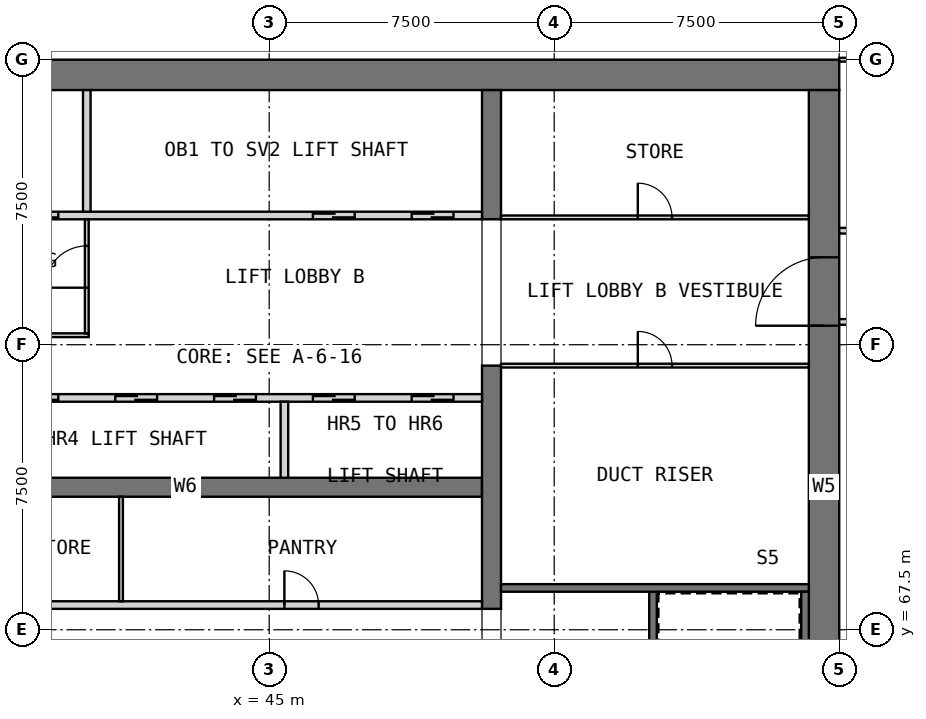
"""IFC4 building model, lengths in metres.
Left out: names, types, materials, properties, quantities, classifications, styles, units other than length and angle.
Written with IfcOpenShell. Run it as: python <this file> out.ifc"""

import sys

from ifc_helpers import new_model, si_unit, direction, frame, frame_2d, origin, place, context, subcontext, project, spatial, rectangle, extrude, element, fill, save


model = new_model("IFC4")
c1 = context("Model", 3, precision=1e-05, world=origin(), true_north=direction((0.0, 1.0)))
c2 = subcontext(c1, "Body", "Model", "MODEL_VIEW")
j1 = project(units=[si_unit("LENGTHUNIT", "METRE"), si_unit("PLANEANGLEUNIT", "RADIAN")], contexts=[c1])
p1 = place(None, origin())
s1 = spatial("IfcSite", under=j1, at=p1, CompositionType="ELEMENT")
p2 = place(p1, origin())
s2 = spatial("IfcBuilding", under=s1, at=p2, CompositionType="ELEMENT")
p3 = place(p2, frame((0.0, 0.0, 133.8)))
s3 = spatial("IfcBuildingStorey", under=s2, at=p3, CompositionType="ELEMENT", Elevation=133.8)
p4 = place(p3, frame((30.0, 82.1, 0.0), z_axis=(0.0, 0.0, 1.0), x_axis=(1.0, 0.0, 0.0)))
e1 = element("IfcWall", 1, at=p4, inside=s3, PredefinedType="SHEAR", context=c2, shape_type="SweptSolid", body=[
    extrude(rectangle(XDim=30.0, YDim=0.8, at=frame_2d((15.0, 0.0))), origin(), (0.0, 0.0, 1.0), 3.6),
])
p5 = place(p3, frame((59.6, 60.8, 0.0), z_axis=(0.0, 0.0, 1.0), x_axis=(0.0, 1.0, 0.0)))
e2 = element("IfcWall", 2, at=p5, inside=s3, PredefinedType="SHEAR", context=c2, shape_type="SweptSolid", body=[
    extrude(rectangle(XDim=20.9, YDim=0.8, at=frame_2d((10.45, 0.0))), origin(), (0.0, 0.0, 1.0), 3.6),
])
p6 = place(p5, frame((14.7, 0.0, 0.0)))
e3 = element("IfcOpeningElement", 3, at=p6, cuts=e2, PredefinedType="OPENING", context=c2, shape_type="SweptSolid", body=[
    extrude(rectangle(XDim=1.8, YDim=2.1, at=frame_2d((0.9, 1.05))), frame((0.0, 0.41, 0.0), z_axis=(0.0, -1.0, 0.0), x_axis=(1.0, 0.0, 0.0)), (0.0, 0.0, 1.0), 0.82),
])
p7 = place(p3, frame((35.0, 71.25, 0.0), z_axis=(0.0, 0.0, 1.0), x_axis=(1.0, 0.0, 0.0)))
e4 = element("IfcWall", 4, at=p7, inside=s3, PredefinedType="SHEAR", context=c2, shape_type="SweptSolid", body=[
    extrude(rectangle(XDim=15.6, YDim=0.5, at=frame_2d((7.8, 0.0))), origin(), (0.0, 0.0, 1.0), 3.6),
])
p8 = place(p3, frame((50.85, 68.05, 0.0), z_axis=(0.0, 0.0, 1.0), x_axis=(0.0, 1.0, 0.0)))
e5 = element("IfcWall", 5, at=p8, inside=s3, PredefinedType="SHEAR", context=c2, shape_type="SweptSolid", body=[
    extrude(rectangle(XDim=6.4, YDim=0.5, at=frame_2d((3.2, 0.0))), origin(), (0.0, 0.0, 1.0), 3.6),
])
p9 = place(p3, frame((50.85, 78.3, 0.0), z_axis=(0.0, 0.0, 1.0), x_axis=(0.0, 1.0, 0.0)))
e6 = element("IfcWall", 6, at=p9, inside=s3, PredefinedType="SHEAR", context=c2, shape_type="SweptSolid", body=[
    extrude(rectangle(XDim=3.4, YDim=0.5, at=frame_2d((1.7, 0.0))), origin(), (0.0, 0.0, 1.0), 3.6),
])
p10 = place(p3, frame((35.0, 68.15, 0.0), z_axis=(0.0, 0.0, 1.0), x_axis=(1.0, 0.0, 0.0)))
e7 = element("IfcWall", 7, at=p10, inside=s3, PredefinedType="PARTITIONING", context=c2, shape_type="SweptSolid", body=[
    extrude(rectangle(XDim=15.6, YDim=0.2, at=frame_2d((7.8, 0.0))), origin(), (0.0, 0.0, 1.0), 3.35),
])
p11 = place(p10, frame((2.6, 0.0, 0.0)))
e8 = element("IfcOpeningElement", 8, at=p11, cuts=e7, PredefinedType="OPENING", context=c2, shape_type="SweptSolid", body=[
    extrude(rectangle(XDim=0.9, YDim=2.1, at=frame_2d((0.45, 1.05))), frame((0.0, 0.11, 0.0), z_axis=(0.0, -1.0, 0.0), x_axis=(1.0, 0.0, 0.0)), (0.0, 0.0, 1.0), 0.22),
])
p12 = place(p10, frame((10.4, 0.0, 0.0)))
e9 = element("IfcOpeningElement", 9, at=p12, cuts=e7, PredefinedType="OPENING", context=c2, shape_type="SweptSolid", body=[
    extrude(rectangle(XDim=0.9, YDim=2.1, at=frame_2d((0.45, 1.05))), frame((0.0, 0.11, 0.0), z_axis=(0.0, -1.0, 0.0), x_axis=(1.0, 0.0, 0.0)), (0.0, 0.0, 1.0), 0.22),
])
p13 = place(p3, frame((41.1, 68.25, 0.0), z_axis=(0.0, 0.0, 1.0), x_axis=(0.0, 1.0, 0.0)))
e10 = element("IfcWall", 10, at=p13, inside=s3, PredefinedType="PARTITIONING", context=c2, shape_type="SweptSolid", body=[
    extrude(rectangle(XDim=2.75, YDim=0.1, at=frame_2d((1.375, 0.0))), origin(), (0.0, 0.0, 1.0), 3.35),
])
p14 = place(p3, frame((35.0, 73.6, 0.0), z_axis=(0.0, 0.0, 1.0), x_axis=(1.0, 0.0, 0.0)))
e11 = element("IfcWall", 11, at=p14, inside=s3, PredefinedType="SOLIDWALL", context=c2, shape_type="SweptSolid", body=[
    extrude(rectangle(XDim=15.6, YDim=0.2, at=frame_2d((7.8, 0.0))), origin(), (0.0, 0.0, 1.0), 3.6),
])
p15 = place(p14, frame((0.75, 0.0, 0.0)))
e12 = element("IfcOpeningElement", 12, at=p15, cuts=e11, PredefinedType="OPENING", context=c2, shape_type="SweptSolid", body=[
    extrude(rectangle(XDim=1.1, YDim=2.1, at=frame_2d((0.55, 1.05))), frame((0.0, 0.11, 0.0), z_axis=(0.0, -1.0, 0.0), x_axis=(1.0, 0.0, 0.0)), (0.0, 0.0, 1.0), 0.22),
])
p16 = place(p14, frame((3.35, 0.0, 0.0)))
e13 = element("IfcOpeningElement", 13, at=p16, cuts=e11, PredefinedType="OPENING", context=c2, shape_type="SweptSolid", body=[
    extrude(rectangle(XDim=1.1, YDim=2.1, at=frame_2d((0.55, 1.05))), frame((0.0, 0.11, 0.0), z_axis=(0.0, -1.0, 0.0), x_axis=(1.0, 0.0, 0.0)), (0.0, 0.0, 1.0), 0.22),
])
p17 = place(p14, frame((5.95, 0.0, 0.0)))
e14 = element("IfcOpeningElement", 14, at=p17, cuts=e11, PredefinedType="OPENING", context=c2, shape_type="SweptSolid", body=[
    extrude(rectangle(XDim=1.1, YDim=2.1, at=frame_2d((0.55, 1.05))), frame((0.0, 0.11, 0.0), z_axis=(0.0, -1.0, 0.0), x_axis=(1.0, 0.0, 0.0)), (0.0, 0.0, 1.0), 0.22),
])
p18 = place(p14, frame((8.55, 0.0, 0.0)))
e15 = element("IfcOpeningElement", 15, at=p18, cuts=e11, PredefinedType="OPENING", context=c2, shape_type="SweptSolid", body=[
    extrude(rectangle(XDim=1.1, YDim=2.1, at=frame_2d((0.55, 1.05))), frame((0.0, 0.11, 0.0), z_axis=(0.0, -1.0, 0.0), x_axis=(1.0, 0.0, 0.0)), (0.0, 0.0, 1.0), 0.22),
])
p19 = place(p14, frame((11.15, 0.0, 0.0)))
e16 = element("IfcOpeningElement", 16, at=p19, cuts=e11, PredefinedType="OPENING", context=c2, shape_type="SweptSolid", body=[
    extrude(rectangle(XDim=1.1, YDim=2.1, at=frame_2d((0.55, 1.05))), frame((0.0, 0.11, 0.0), z_axis=(0.0, -1.0, 0.0), x_axis=(1.0, 0.0, 0.0)), (0.0, 0.0, 1.0), 0.22),
])
p20 = place(p14, frame((13.75, 0.0, 0.0)))
e17 = element("IfcOpeningElement", 17, at=p20, cuts=e11, PredefinedType="OPENING", context=c2, shape_type="SweptSolid", body=[
    extrude(rectangle(XDim=1.1, YDim=2.1, at=frame_2d((0.55, 1.05))), frame((0.0, 0.11, 0.0), z_axis=(0.0, -1.0, 0.0), x_axis=(1.0, 0.0, 0.0)), (0.0, 0.0, 1.0), 0.22),
])
p21 = place(p3, frame((45.4, 71.5, 0.0), z_axis=(0.0, 0.0, 1.0), x_axis=(0.0, 1.0, 0.0)))
e18 = element("IfcWall", 18, at=p21, inside=s3, PredefinedType="SOLIDWALL", context=c2, shape_type="SweptSolid", body=[
    extrude(rectangle(XDim=2.0, YDim=0.2, at=frame_2d((1.0, 0.0))), origin(), (0.0, 0.0, 1.0), 3.6),
])
p22 = place(p3, frame((35.0, 78.4, 0.0), z_axis=(0.0, 0.0, 1.0), x_axis=(1.0, 0.0, 0.0)))
e19 = element("IfcWall", 19, at=p22, inside=s3, PredefinedType="SOLIDWALL", context=c2, shape_type="SweptSolid", body=[
    extrude(rectangle(XDim=15.6, YDim=0.2, at=frame_2d((7.8, 0.0))), origin(), (0.0, 0.0, 1.0), 3.6),
])
p23 = place(p22, frame((0.75, 0.0, 0.0)))
e20 = element("IfcOpeningElement", 20, at=p23, cuts=e19, PredefinedType="OPENING", context=c2, shape_type="SweptSolid", body=[
    extrude(rectangle(XDim=1.1, YDim=2.1, at=frame_2d((0.55, 1.05))), frame((0.0, 0.11, 0.0), z_axis=(0.0, -1.0, 0.0), x_axis=(1.0, 0.0, 0.0)), (0.0, 0.0, 1.0), 0.22),
])
p24 = place(p22, frame((3.35, 0.0, 0.0)))
e21 = element("IfcOpeningElement", 21, at=p24, cuts=e19, PredefinedType="OPENING", context=c2, shape_type="SweptSolid", body=[
    extrude(rectangle(XDim=1.1, YDim=2.1, at=frame_2d((0.55, 1.05))), frame((0.0, 0.11, 0.0), z_axis=(0.0, -1.0, 0.0), x_axis=(1.0, 0.0, 0.0)), (0.0, 0.0, 1.0), 0.22),
])
p25 = place(p22, frame((11.15, 0.0, 0.0)))
e22 = element("IfcOpeningElement", 22, at=p25, cuts=e19, PredefinedType="OPENING", context=c2, shape_type="SweptSolid", body=[
    extrude(rectangle(XDim=1.1, YDim=2.1, at=frame_2d((0.55, 1.05))), frame((0.0, 0.11, 0.0), z_axis=(0.0, -1.0, 0.0), x_axis=(1.0, 0.0, 0.0)), (0.0, 0.0, 1.0), 0.22),
])
p26 = place(p22, frame((13.75, 0.0, 0.0)))
e23 = element("IfcOpeningElement", 23, at=p26, cuts=e19, PredefinedType="OPENING", context=c2, shape_type="SweptSolid", body=[
    extrude(rectangle(XDim=1.1, YDim=2.1, at=frame_2d((0.55, 1.05))), frame((0.0, 0.11, 0.0), z_axis=(0.0, -1.0, 0.0), x_axis=(1.0, 0.0, 0.0)), (0.0, 0.0, 1.0), 0.22),
])
p27 = place(p3, frame((40.2, 78.5, 0.0), z_axis=(0.0, 0.0, 1.0), x_axis=(0.0, 1.0, 0.0)))
e24 = element("IfcWall", 24, at=p27, inside=s3, PredefinedType="SOLIDWALL", context=c2, shape_type="SweptSolid", body=[
    extrude(rectangle(XDim=3.2, YDim=0.2, at=frame_2d((1.6, 0.0))), origin(), (0.0, 0.0, 1.0), 3.6),
])
p28 = place(p3, frame((35.0, 75.25, 0.0), z_axis=(0.0, 0.0, 1.0), x_axis=(1.0, 0.0, 0.0)))
e25 = element("IfcWall", 25, at=p28, inside=s3, PredefinedType="PARTITIONING", context=c2, shape_type="SweptSolid", body=[
    extrude(rectangle(XDim=5.25, YDim=0.1, at=frame_2d((2.625, 0.0))), origin(), (0.0, 0.0, 1.0), 3.35),
])
p29 = place(p3, frame((40.2, 75.3, 0.0), z_axis=(0.0, 0.0, 1.0), x_axis=(0.0, 1.0, 0.0)))
e26 = element("IfcWall", 26, at=p29, inside=s3, PredefinedType="PARTITIONING", context=c2, shape_type="SweptSolid", body=[
    extrude(rectangle(XDim=3.0, YDim=0.1, at=frame_2d((1.5, 0.0))), origin(), (0.0, 0.0, 1.0), 3.35),
])
p30 = place(p29, frame((1.2, 0.0, 0.0)))
e27 = element("IfcOpeningElement", 27, at=p30, cuts=e26, PredefinedType="OPENING", context=c2, shape_type="SweptSolid", body=[
    extrude(rectangle(XDim=1.1, YDim=2.1, at=frame_2d((0.55, 1.05))), frame((0.0, 0.06, 0.0), z_axis=(0.0, -1.0, 0.0), x_axis=(1.0, 0.0, 0.0)), (0.0, 0.0, 1.0), 0.12),
])
p31 = place(p3, frame((55.1, 60.8, 0.0), z_axis=(0.0, 0.0, 1.0), x_axis=(0.0, 1.0, 0.0)))
e28 = element("IfcWall", 28, at=p31, inside=s3, PredefinedType="SOLIDWALL", context=c2, shape_type="SweptSolid", body=[
    extrude(rectangle(XDim=7.8, YDim=0.2, at=frame_2d((3.9, 0.0))), origin(), (0.0, 0.0, 1.0), 3.35),
])
p32 = place(p3, frame((51.1, 68.6, 0.0), z_axis=(0.0, 0.0, 1.0), x_axis=(1.0, 0.0, 0.0)))
e29 = element("IfcWall", 29, at=p32, inside=s3, PredefinedType="SOLIDWALL", context=c2, shape_type="SweptSolid", body=[
    extrude(rectangle(XDim=8.1, YDim=0.2, at=frame_2d((4.05, 0.0))), origin(), (0.0, 0.0, 1.0), 3.35),
])
p33 = place(p3, frame((59.1, 60.8, 0.0), z_axis=(0.0, 0.0, 1.0), x_axis=(0.0, 1.0, 0.0)))
e30 = element("IfcWall", 30, at=p33, inside=s3, PredefinedType="SOLIDWALL", context=c2, shape_type="SweptSolid", body=[
    extrude(rectangle(XDim=7.7, YDim=0.2, at=frame_2d((3.85, 0.0))), origin(), (0.0, 0.0, 1.0), 3.35),
])
p34 = place(p3, frame((51.1, 74.45, 0.0), z_axis=(0.0, 0.0, 1.0), x_axis=(1.0, 0.0, 0.0)))
e31 = element("IfcWall", 31, at=p34, inside=s3, PredefinedType="PARTITIONING", context=c2, shape_type="SweptSolid", body=[
    extrude(rectangle(XDim=8.1, YDim=0.1, at=frame_2d((4.05, 0.0))), origin(), (0.0, 0.0, 1.0), 3.35),
])
p35 = place(p34, frame((3.6, 0.0, 0.0)))
e32 = element("IfcOpeningElement", 32, at=p35, cuts=e31, PredefinedType="OPENING", context=c2, shape_type="SweptSolid", body=[
    extrude(rectangle(XDim=0.9, YDim=2.1, at=frame_2d((0.45, 1.05))), frame((0.0, 0.06, 0.0), z_axis=(0.0, -1.0, 0.0), x_axis=(1.0, 0.0, 0.0)), (0.0, 0.0, 1.0), 0.12),
])
p36 = place(p3, frame((51.1, 78.35, 0.0), z_axis=(0.0, 0.0, 1.0), x_axis=(1.0, 0.0, 0.0)))
e33 = element("IfcWall", 33, at=p36, inside=s3, PredefinedType="PARTITIONING", context=c2, shape_type="SweptSolid", body=[
    extrude(rectangle(XDim=8.1, YDim=0.1, at=frame_2d((4.05, 0.0))), origin(), (0.0, 0.0, 1.0), 3.35),
])
p37 = place(p36, frame((3.6, 0.0, 0.0)))
e34 = element("IfcOpeningElement", 34, at=p37, cuts=e33, PredefinedType="OPENING", context=c2, shape_type="SweptSolid", body=[
    extrude(rectangle(XDim=0.9, YDim=2.1, at=frame_2d((0.45, 1.05))), frame((0.0, 0.06, 0.0), z_axis=(0.0, -1.0, 0.0), x_axis=(1.0, 0.0, 0.0)), (0.0, 0.0, 1.0), 0.12),
])
p38 = place(p3, frame((60.0, 82.5, 0.0), z_axis=(0.0, 0.0, 1.0), x_axis=(1.0, 0.0, 0.0)))
e35 = element("IfcWall", 35, at=p38, inside=s3, PredefinedType="PARTITIONING", context=c2, shape_type="SweptSolid", body=[
    extrude(rectangle(XDim=11.175, YDim=0.1, at=frame_2d((5.587, 0.0))), origin(), (0.0, 0.0, 1.0), 3.35),
])
for number, where, z_axis, x_axis in (
    (36, (60.0, 75.6, 0.0), (0.0, 0.0, 1.0), (1.0, 0.0, 0.0)),
    (37, (60.0, 78.0, 0.0), (0.0, 0.0, 1.0), (1.0, 0.0, 0.0)),
):
    element("IfcWall", number, at=place(p3, frame(where, z_axis=z_axis, x_axis=x_axis)), inside=s3, PredefinedType="PARTITIONING", context=c2, shape_type="SweptSolid", body=[
        extrude(rectangle(XDim=11.25, YDim=0.15, at=frame_2d((5.625, 0.0))), origin(), (0.0, 0.0, 1.0), 3.35),
    ])
p39 = place(p12, origin())
e38 = element("IfcDoor", 38, at=p39, inside=s3, OperationType="SINGLE_SWING_LEFT", PredefinedType="DOOR", context=c2, shape_type="SweptSolid", body=[
    extrude(rectangle(XDim=0.9, YDim=2.1, at=frame_2d((0.45, 1.05))), frame((0.0, 0.025, 0.0), z_axis=(0.0, -1.0, 0.0), x_axis=(1.0, 0.0, 0.0)), (0.0, 0.0, 1.0), 0.05),
])
fill(e9, e38)
p40 = place(p16, origin())
e39 = element("IfcDoor", 39, at=p40, inside=s3, OperationType="DOUBLE_DOOR_SLIDING", PredefinedType="DOOR", context=c2, shape_type="SweptSolid", body=[
    extrude(rectangle(XDim=1.1, YDim=2.1, at=frame_2d((0.55, 1.05))), frame((0.0, 0.025, 0.0), z_axis=(0.0, -1.0, 0.0), x_axis=(1.0, 0.0, 0.0)), (0.0, 0.0, 1.0), 0.05),
])
fill(e13, e39)
p41 = place(p17, origin())
e40 = element("IfcDoor", 40, at=p41, inside=s3, OperationType="DOUBLE_DOOR_SLIDING", PredefinedType="DOOR", context=c2, shape_type="SweptSolid", body=[
    extrude(rectangle(XDim=1.1, YDim=2.1, at=frame_2d((0.55, 1.05))), frame((0.0, 0.025, 0.0), z_axis=(0.0, -1.0, 0.0), x_axis=(1.0, 0.0, 0.0)), (0.0, 0.0, 1.0), 0.05),
])
fill(e14, e40)
p42 = place(p18, origin())
e41 = element("IfcDoor", 41, at=p42, inside=s3, OperationType="DOUBLE_DOOR_SLIDING", PredefinedType="DOOR", context=c2, shape_type="SweptSolid", body=[
    extrude(rectangle(XDim=1.1, YDim=2.1, at=frame_2d((0.55, 1.05))), frame((0.0, 0.025, 0.0), z_axis=(0.0, -1.0, 0.0), x_axis=(1.0, 0.0, 0.0)), (0.0, 0.0, 1.0), 0.05),
])
fill(e15, e41)
p43 = place(p19, origin())
e42 = element("IfcDoor", 42, at=p43, inside=s3, OperationType="DOUBLE_DOOR_SLIDING", PredefinedType="DOOR", context=c2, shape_type="SweptSolid", body=[
    extrude(rectangle(XDim=1.1, YDim=2.1, at=frame_2d((0.55, 1.05))), frame((0.0, 0.025, 0.0), z_axis=(0.0, -1.0, 0.0), x_axis=(1.0, 0.0, 0.0)), (0.0, 0.0, 1.0), 0.05),
])
fill(e16, e42)
p44 = place(p20, origin())
e43 = element("IfcDoor", 43, at=p44, inside=s3, OperationType="DOUBLE_DOOR_SLIDING", PredefinedType="DOOR", context=c2, shape_type="SweptSolid", body=[
    extrude(rectangle(XDim=1.1, YDim=2.1, at=frame_2d((0.55, 1.05))), frame((0.0, 0.025, 0.0), z_axis=(0.0, -1.0, 0.0), x_axis=(1.0, 0.0, 0.0)), (0.0, 0.0, 1.0), 0.05),
])
fill(e17, e43)
p45 = place(p24, origin())
e44 = element("IfcDoor", 44, at=p45, inside=s3, OperationType="DOUBLE_DOOR_SLIDING", PredefinedType="DOOR", context=c2, shape_type="SweptSolid", body=[
    extrude(rectangle(XDim=1.1, YDim=2.1, at=frame_2d((0.55, 1.05))), frame((0.0, 0.025, 0.0), z_axis=(0.0, -1.0, 0.0), x_axis=(1.0, 0.0, 0.0)), (0.0, 0.0, 1.0), 0.05),
])
fill(e21, e44)
p46 = place(p25, origin())
e45 = element("IfcDoor", 45, at=p46, inside=s3, OperationType="DOUBLE_DOOR_SLIDING", PredefinedType="DOOR", context=c2, shape_type="SweptSolid", body=[
    extrude(rectangle(XDim=1.1, YDim=2.1, at=frame_2d((0.55, 1.05))), frame((0.0, 0.025, 0.0), z_axis=(0.0, -1.0, 0.0), x_axis=(1.0, 0.0, 0.0)), (0.0, 0.0, 1.0), 0.05),
])
fill(e22, e45)
p47 = place(p26, origin())
e46 = element("IfcDoor", 46, at=p47, inside=s3, OperationType="DOUBLE_DOOR_SLIDING", PredefinedType="DOOR", context=c2, shape_type="SweptSolid", body=[
    extrude(rectangle(XDim=1.1, YDim=2.1, at=frame_2d((0.55, 1.05))), frame((0.0, 0.025, 0.0), z_axis=(0.0, -1.0, 0.0), x_axis=(1.0, 0.0, 0.0)), (0.0, 0.0, 1.0), 0.05),
])
fill(e23, e46)
p48 = place(p6, origin())
e47 = element("IfcDoor", 47, at=p48, inside=s3, OperationType="DOUBLE_DOOR_SINGLE_SWING", PredefinedType="DOOR", context=c2, shape_type="SweptSolid", body=[
    extrude(rectangle(XDim=1.8, YDim=2.1, at=frame_2d((0.9, 1.05))), frame((0.0, 0.025, 0.0), z_axis=(0.0, -1.0, 0.0), x_axis=(1.0, 0.0, 0.0)), (0.0, 0.0, 1.0), 0.05),
])
fill(e3, e47)
p49 = place(p30, origin())
e48 = element("IfcDoor", 48, at=p49, inside=s3, OperationType="SINGLE_SWING_LEFT", PredefinedType="DOOR", context=c2, shape_type="SweptSolid", body=[
    extrude(rectangle(XDim=1.1, YDim=2.1, at=frame_2d((0.55, 1.05))), frame((0.0, 0.025, 0.0), z_axis=(0.0, -1.0, 0.0), x_axis=(1.0, 0.0, 0.0)), (0.0, 0.0, 1.0), 0.05),
])
fill(e27, e48)
p50 = place(p35, origin())
e49 = element("IfcDoor", 49, at=p50, inside=s3, OperationType="SINGLE_SWING_RIGHT", PredefinedType="DOOR", context=c2, shape_type="SweptSolid", body=[
    extrude(rectangle(XDim=0.9, YDim=2.1, at=frame_2d((0.45, 1.05))), frame((0.0, 0.025, 0.0), z_axis=(0.0, -1.0, 0.0), x_axis=(1.0, 0.0, 0.0)), (0.0, 0.0, 1.0), 0.05),
])
fill(e32, e49)
p51 = place(p37, origin())
e50 = element("IfcDoor", 50, at=p51, inside=s3, OperationType="SINGLE_SWING_RIGHT", PredefinedType="DOOR", context=c2, shape_type="SweptSolid", body=[
    extrude(rectangle(XDim=0.9, YDim=2.1, at=frame_2d((0.45, 1.05))), frame((0.0, 0.025, 0.0), z_axis=(0.0, -1.0, 0.0), x_axis=(1.0, 0.0, 0.0)), (0.0, 0.0, 1.0), 0.05),
])
fill(e34, e50)
save(model, sys.argv[1])
